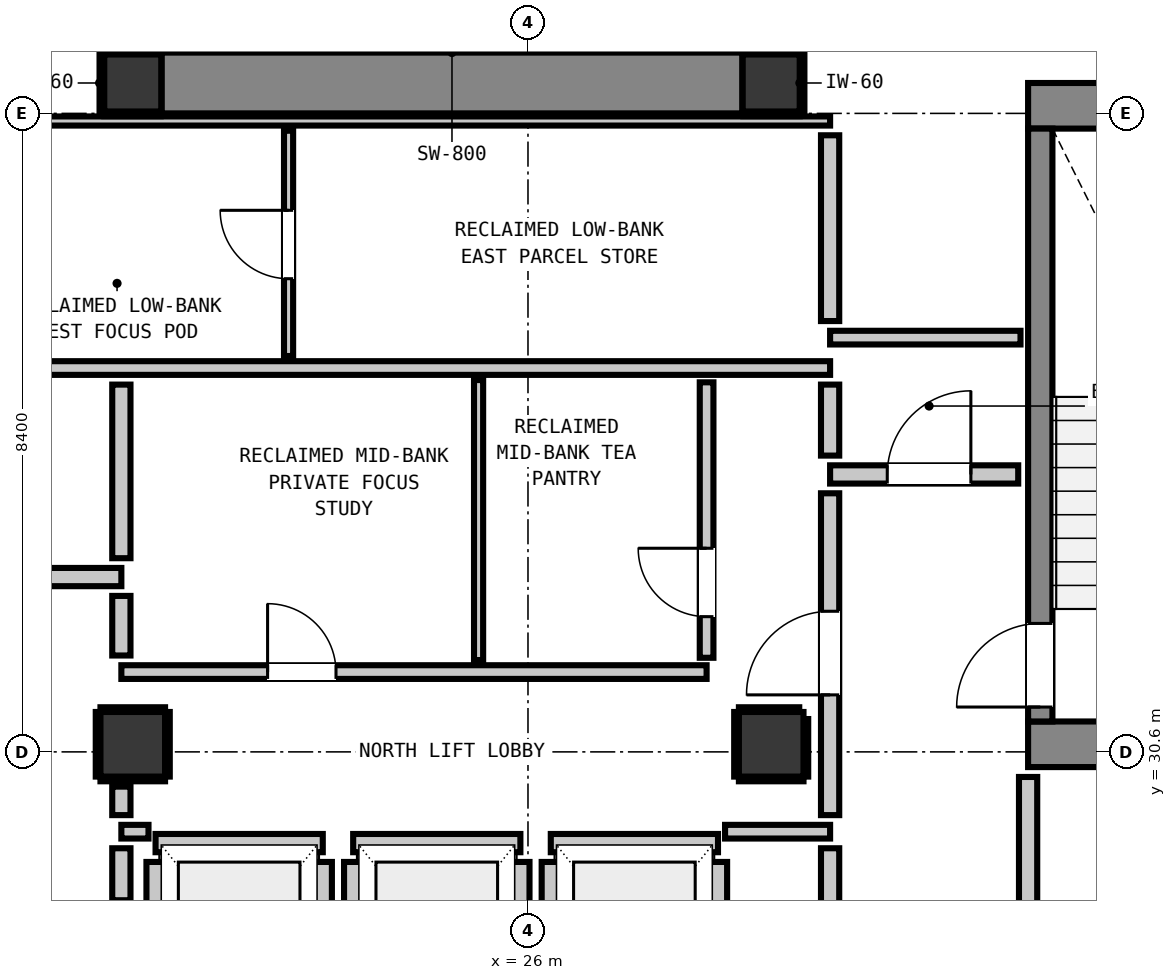
"""IFC4 building model, lengths in metres.
Left out: names, types, materials, properties, quantities, classifications, styles, units other than length and angle.
Written with IfcOpenShell. Run it as: python <this file> out.ifc"""

import sys

from ifc_helpers import new_model, si_unit, direction, frame, frame_2d, origin, origin_2d, place, context, subcontext, project, spatial, rectangle, extrude, element, fill, save


model = new_model("IFC4")
c1 = context("Model", 3, precision=1e-05, world=origin(), true_north=direction((0.0, 1.0)))
c2 = subcontext(c1, "Body", "Model", "MODEL_VIEW")
j1 = project(units=[si_unit("LENGTHUNIT", "METRE"), si_unit("PLANEANGLEUNIT", "RADIAN")], contexts=[c1])
p1 = place(None, origin())
s1 = spatial("IfcSite", under=j1, at=p1, CompositionType="ELEMENT")
p2 = place(p1, origin())
s2 = spatial("IfcBuilding", under=s1, at=p2, CompositionType="ELEMENT")
p3 = place(p2, frame((0.0, 0.0, 213.4)))
s3 = spatial("IfcBuildingStorey", under=s2, at=p3, CompositionType="ELEMENT", Elevation=213.4)
for number, where, z_axis, x_axis in (
    (1, (20.8, 39.4, 0.0), (0.0, 0.0, 1.0), (1.0, 0.0, 0.0)),
    (2, (29.2, 39.4, 0.0), (0.0, 0.0, 1.0), (1.0, 0.0, 0.0)),
):
    element("IfcColumn", number, at=place(p3, frame(where, z_axis=z_axis, x_axis=x_axis)), inside=s3, PredefinedType="COLUMN", context=c2, shape_type="SweptSolid", body=[
        extrude(rectangle(XDim=0.75, YDim=0.75, at=origin_2d()), origin(), (0.0, 0.0, 1.0), 3.32),
    ])
p4 = place(p3, frame((32.58, 39.1, 0.0), z_axis=(0.0, 0.0, 1.0), x_axis=(1.0, 0.0, 0.0)))
e3 = element("IfcWall", 3, at=p4, inside=s3, PredefinedType="SHEAR", context=c2, shape_type="SweptSolid", body=[
    extrude(rectangle(XDim=4.08, YDim=0.6, at=frame_2d((2.04, 0.0))), origin(), (0.0, 0.0, 1.0), 3.32),
])
p5 = place(p3, frame((32.58, 30.7, 0.0), z_axis=(0.0, 0.0, 1.0), x_axis=(1.0, 0.0, 0.0)))
e4 = element("IfcWall", 4, at=p5, inside=s3, PredefinedType="SHEAR", context=c2, shape_type="SweptSolid", body=[
    extrude(rectangle(XDim=3.54, YDim=0.6, at=frame_2d((1.77, 0.0))), origin(), (0.0, 0.0, 1.0), 3.32),
])
p6 = place(p3, frame((21.18, 39.4, 0.0), z_axis=(0.0, 0.0, 1.0), x_axis=(1.0, 0.0, 0.0)))
e5 = element("IfcWall", 5, at=p6, inside=s3, PredefinedType="SHEAR", context=c2, shape_type="SweptSolid", body=[
    extrude(rectangle(XDim=7.64, YDim=0.8, at=frame_2d((3.82, 0.0))), origin(), (0.0, 0.0, 1.0), 3.32),
])
p7 = place(p3, frame((32.74, 31.0, 0.0), z_axis=(0.0, 0.0, 1.0), x_axis=(0.0, 1.0, 0.0)))
e6 = element("IfcWall", 6, at=p7, inside=s3, PredefinedType="SHEAR", context=c2, shape_type="SweptSolid", body=[
    extrude(rectangle(XDim=7.8, YDim=0.32, at=frame_2d((3.9, 0.0))), origin(), (0.0, 0.0, 1.0), 3.32),
])
p8 = place(p7, frame((0.19, 0.0, 0.0)))
e7 = element("IfcOpeningElement", 7, at=p8, cuts=e6, PredefinedType="OPENING", context=c2, shape_type="SweptSolid", body=[
    extrude(rectangle(XDim=1.1, YDim=2.15, at=frame_2d((0.55, 1.075))), frame((0.0, 0.17, 0.0), z_axis=(0.0, -1.0, 0.0), x_axis=(1.0, 0.0, 0.0)), (0.0, 0.0, 1.0), 0.34),
])
for number, where, z_axis, x_axis in (
    (8, (20.8, 30.7, 0.0), (0.0, 0.0, 1.0), (1.0, 0.0, 0.0)),
    (9, (29.2, 30.7, 0.0), (0.0, 0.0, 1.0), (1.0, 0.0, 0.0)),
):
    element("IfcColumn", number, at=place(p3, frame(where, z_axis=z_axis, x_axis=x_axis)), inside=s3, PredefinedType="COLUMN", context=c2, shape_type="SweptSolid", body=[
        extrude(rectangle(XDim=0.85, YDim=0.85, at=origin_2d()), origin(), (0.0, 0.0, 1.0), 3.32),
    ])
p9 = place(p3, frame((21.1, 29.4, 0.0), z_axis=(0.0, 0.0, 1.0), x_axis=(1.0, 0.0, 0.0)))
e10 = element("IfcWall", 10, at=p9, inside=s3, PredefinedType="PARTITIONING", context=c2, shape_type="SweptSolid", body=[
    extrude(rectangle(XDim=2.2, YDim=0.24, at=frame_2d((1.1, 0.0))), origin(), (0.0, 0.0, 1.0), 3.1),
])
p10 = place(p3, frame((21.1, 27.048, 0.0), z_axis=(0.0, 0.0, 1.0), x_axis=(0.0, 1.0, 0.0)))
e11 = element("IfcWall", 11, at=p10, inside=s3, PredefinedType="PARTITIONING", context=c2, shape_type="SweptSolid", body=[
    extrude(rectangle(XDim=2.104, YDim=0.24, at=frame_2d((1.052, 0.0))), origin(), (0.0, 0.0, 1.0), 2.335),
])
p11 = place(p3, frame((23.3, 27.048, 0.0), z_axis=(0.0, 0.0, 1.0), x_axis=(0.0, 1.0, 0.0)))
e12 = element("IfcWall", 12, at=p11, inside=s3, PredefinedType="PARTITIONING", context=c2, shape_type="SweptSolid", body=[
    extrude(rectangle(XDim=2.104, YDim=0.24, at=frame_2d((1.052, 0.0))), origin(), (0.0, 0.0, 1.0), 3.1),
])
p12 = place(p3, frame((23.7, 29.4, 0.0), z_axis=(0.0, 0.0, 1.0), x_axis=(1.0, 0.0, 0.0)))
e13 = element("IfcWall", 13, at=p12, inside=s3, PredefinedType="PARTITIONING", context=c2, shape_type="SweptSolid", body=[
    extrude(rectangle(XDim=2.2, YDim=0.24, at=frame_2d((1.1, 0.0))), origin(), (0.0, 0.0, 1.0), 3.1),
])
for number, where, z_axis, x_axis in (
    (14, (23.7, 27.048, 0.0), (0.0, 0.0, 1.0), (0.0, 1.0, 0.0)),
    (15, (25.9, 27.048, 0.0), (0.0, 0.0, 1.0), (0.0, 1.0, 0.0)),
):
    element("IfcWall", number, at=place(p3, frame(where, z_axis=z_axis, x_axis=x_axis)), inside=s3, PredefinedType="PARTITIONING", context=c2, shape_type="SweptSolid", body=[
        extrude(rectangle(XDim=2.104, YDim=0.24, at=frame_2d((1.052, 0.0))), origin(), (0.0, 0.0, 1.0), 3.1),
    ])
p13 = place(p3, frame((26.3, 29.4, 0.0), z_axis=(0.0, 0.0, 1.0), x_axis=(1.0, 0.0, 0.0)))
e16 = element("IfcWall", 16, at=p13, inside=s3, PredefinedType="PARTITIONING", context=c2, shape_type="SweptSolid", body=[
    extrude(rectangle(XDim=2.2, YDim=0.24, at=frame_2d((1.1, 0.0))), origin(), (0.0, 0.0, 1.0), 3.1),
])
p14 = place(p3, frame((26.3, 27.048, 0.0), z_axis=(0.0, 0.0, 1.0), x_axis=(0.0, 1.0, 0.0)))
e17 = element("IfcWall", 17, at=p14, inside=s3, PredefinedType="PARTITIONING", context=c2, shape_type="SweptSolid", body=[
    extrude(rectangle(XDim=2.104, YDim=0.24, at=frame_2d((1.052, 0.0))), origin(), (0.0, 0.0, 1.0), 3.1),
])
p15 = place(p3, frame((28.5, 27.33, 0.0), z_axis=(0.0, 0.0, 1.0), x_axis=(0.0, 1.0, 0.0)))
e18 = element("IfcWall", 18, at=p15, inside=s3, PredefinedType="PARTITIONING", context=c2, shape_type="SweptSolid", body=[
    extrude(rectangle(XDim=1.822, YDim=0.24, at=frame_2d((0.911, 0.0))), origin(), (0.0, 0.0, 1.0), 3.1),
])
p16 = place(p3, frame((17.45, 32.9, 0.0), z_axis=(0.0, 0.0, 1.0), x_axis=(1.0, 0.0, 0.0)))
e19 = element("IfcWall", 19, at=p16, inside=s3, PredefinedType="PARTITIONING", context=c2, shape_type="SweptSolid", body=[
    extrude(rectangle(XDim=3.2, YDim=0.24, at=frame_2d((1.6, 0.0))), origin(), (0.0, 0.0, 1.0), 3.1),
])
p17 = place(p16, frame((0.159, 0.0, 0.0)))
e20 = element("IfcOpeningElement", 20, at=p17, cuts=e19, PredefinedType="OPENING", context=c2, shape_type="SweptSolid", body=[
    extrude(rectangle(XDim=1.1, YDim=2.15, at=frame_2d((0.55, 1.075))), frame((0.0, 0.13, 0.0), z_axis=(0.0, -1.0, 0.0), x_axis=(1.0, 0.0, 0.0)), (0.0, 0.0, 1.0), 0.26),
])
p18 = place(p3, frame((29.975, 34.25, 0.0), z_axis=(0.0, 0.0, 1.0), x_axis=(1.0, 0.0, 0.0)))
e21 = element("IfcWall", 21, at=p18, inside=s3, PredefinedType="PARTITIONING", context=c2, shape_type="SweptSolid", body=[
    extrude(rectangle(XDim=2.475, YDim=0.24, at=frame_2d((1.237, 0.0))), origin(), (0.0, 0.0, 1.0), 3.1),
])
p19 = place(p18, frame((0.752, 0.0, 0.0)))
e22 = element("IfcOpeningElement", 22, at=p19, cuts=e21, PredefinedType="OPENING", context=c2, shape_type="SweptSolid", body=[
    extrude(rectangle(XDim=1.1, YDim=2.15, at=frame_2d((0.55, 1.075))), frame((0.0, 0.13, 0.0), z_axis=(0.0, -1.0, 0.0), x_axis=(1.0, 0.0, 0.0)), (0.0, 0.0, 1.0), 0.26),
])
p20 = place(p3, frame((20.65, 29.55, 0.0), z_axis=(0.0, 0.0, 1.0), x_axis=(1.0, 0.0, 0.0)))
e23 = element("IfcWall", 23, at=p20, inside=s3, PredefinedType="PARTITIONING", context=c2, shape_type="SweptSolid", body=[
    extrude(rectangle(XDim=0.357, YDim=0.18, at=frame_2d((0.179, 0.0))), origin(), (0.0, 0.0, 1.0), 3.1),
])
p21 = place(p3, frame((28.593, 29.55, 0.0), z_axis=(0.0, 0.0, 1.0), x_axis=(1.0, 0.0, 0.0)))
e24 = element("IfcWall", 24, at=p21, inside=s3, PredefinedType="PARTITIONING", context=c2, shape_type="SweptSolid", body=[
    extrude(rectangle(XDim=1.382, YDim=0.18, at=frame_2d((0.691, 0.0))), origin(), (0.0, 0.0, 1.0), 3.1),
])
p22 = place(p3, frame((20.65, 31.65, 0.0), z_axis=(0.0, 0.0, 1.0), x_axis=(1.0, 0.0, 0.0)))
e25 = element("IfcWall", 25, at=p22, inside=s3, PredefinedType="PARTITIONING", context=c2, shape_type="SweptSolid", body=[
    extrude(rectangle(XDim=7.7, YDim=0.18, at=frame_2d((3.85, 0.0))), origin(), (0.0, 0.0, 1.0), 3.1),
])
p23 = place(p22, frame((1.924, 0.0, 0.0)))
e26 = element("IfcOpeningElement", 26, at=p23, cuts=e25, PredefinedType="OPENING", context=c2, shape_type="SweptSolid", body=[
    extrude(rectangle(XDim=0.9, YDim=2.1, at=frame_2d((0.45, 1.05))), frame((0.0, 0.1, 0.0), z_axis=(0.0, -1.0, 0.0), x_axis=(1.0, 0.0, 0.0)), (0.0, 0.0, 1.0), 0.2),
])
p24 = place(p3, frame((18.95, 35.65, 0.0), z_axis=(0.0, 0.0, 1.0), x_axis=(1.0, 0.0, 0.0)))
e27 = element("IfcWall", 27, at=p24, inside=s3, PredefinedType="PARTITIONING", context=c2, shape_type="SweptSolid", body=[
    extrude(rectangle(XDim=11.025, YDim=0.18, at=frame_2d((5.513, 0.0))), origin(), (0.0, 0.0, 1.0), 3.1),
])
p25 = place(p3, frame((29.975, 36.05, 0.0), z_axis=(0.0, 0.0, 1.0), x_axis=(1.0, 0.0, 0.0)))
e28 = element("IfcWall", 28, at=p25, inside=s3, PredefinedType="PARTITIONING", context=c2, shape_type="SweptSolid", body=[
    extrude(rectangle(XDim=2.505, YDim=0.18, at=frame_2d((1.252, 0.0))), origin(), (0.0, 0.0, 1.0), 3.1),
])
p26 = place(p3, frame((18.95, 38.9, 0.0), z_axis=(0.0, 0.0, 1.0), x_axis=(1.0, 0.0, 0.0)))
e29 = element("IfcWall", 29, at=p26, inside=s3, PredefinedType="PARTITIONING", context=c2, shape_type="SweptSolid", body=[
    extrude(rectangle(XDim=11.025, YDim=0.12, at=frame_2d((5.513, 0.0))), origin(), (0.0, 0.0, 1.0), 3.1),
])
p27 = place(p3, frame((20.65, 28.648, 0.0), z_axis=(0.0, 0.0, 1.0), x_axis=(0.0, 1.0, 0.0)))
e30 = element("IfcWall", 30, at=p27, inside=s3, PredefinedType="PARTITIONING", context=c2, shape_type="SweptSolid", body=[
    extrude(rectangle(XDim=0.684, YDim=0.24, at=frame_2d((0.342, 0.0))), origin(), (0.0, 0.0, 1.0), 2.335),
])
p28 = place(p3, frame((20.65, 29.768, 0.0), z_axis=(0.0, 0.0, 1.0), x_axis=(0.0, 1.0, 0.0)))
e31 = element("IfcWall", 31, at=p28, inside=s3, PredefinedType="PARTITIONING", context=c2, shape_type="SweptSolid", body=[
    extrude(rectangle(XDim=0.375, YDim=0.24, at=frame_2d((0.188, 0.0))), origin(), (0.0, 0.0, 1.0), 2.335),
])
p29 = place(p3, frame((20.65, 31.868, 0.0), z_axis=(0.0, 0.0, 1.0), x_axis=(0.0, 1.0, 0.0)))
e32 = element("IfcWall", 32, at=p29, inside=s3, PredefinedType="PARTITIONING", context=c2, shape_type="SweptSolid", body=[
    extrude(rectangle(XDim=0.784, YDim=0.24, at=frame_2d((0.392, 0.0))), origin(), (0.0, 0.0, 1.0), 2.335),
])
p30 = place(p3, frame((20.65, 33.148, 0.0), z_axis=(0.0, 0.0, 1.0), x_axis=(0.0, 1.0, 0.0)))
e33 = element("IfcWall", 33, at=p30, inside=s3, PredefinedType="PARTITIONING", context=c2, shape_type="SweptSolid", body=[
    extrude(rectangle(XDim=2.284, YDim=0.24, at=frame_2d((1.142, 0.0))), origin(), (0.0, 0.0, 1.0), 2.335),
])
p31 = place(p3, frame((29.975, 25.648, 0.0), z_axis=(0.0, 0.0, 1.0), x_axis=(0.0, 1.0, 0.0)))
e34 = element("IfcWall", 34, at=p31, inside=s3, PredefinedType="PARTITIONING", context=c2, shape_type="SweptSolid", body=[
    extrude(rectangle(XDim=3.684, YDim=0.24, at=frame_2d((1.842, 0.0))), origin(), (0.0, 0.0, 1.0), 3.1),
])
p32 = place(p3, frame((29.975, 29.768, 0.0), z_axis=(0.0, 0.0, 1.0), x_axis=(0.0, 1.0, 0.0)))
e35 = element("IfcWall", 35, at=p32, inside=s3, PredefinedType="PARTITIONING", context=c2, shape_type="SweptSolid", body=[
    extrude(rectangle(XDim=4.234, YDim=0.24, at=frame_2d((2.117, 0.0))), origin(), (0.0, 0.0, 1.0), 3.1),
])
p33 = place(p32, frame((1.582, 0.0, 0.0)))
e36 = element("IfcOpeningElement", 36, at=p33, cuts=e35, PredefinedType="OPENING", context=c2, shape_type="SweptSolid", body=[
    extrude(rectangle(XDim=1.1, YDim=2.15, at=frame_2d((0.55, 1.075))), frame((0.0, 0.13, 0.0), z_axis=(0.0, -1.0, 0.0), x_axis=(1.0, 0.0, 0.0)), (0.0, 0.0, 1.0), 0.26),
])
p34 = place(p3, frame((29.975, 34.498, 0.0), z_axis=(0.0, 0.0, 1.0), x_axis=(0.0, 1.0, 0.0)))
e37 = element("IfcWall", 37, at=p34, inside=s3, PredefinedType="PARTITIONING", context=c2, shape_type="SweptSolid", body=[
    extrude(rectangle(XDim=0.934, YDim=0.24, at=frame_2d((0.467, 0.0))), origin(), (0.0, 0.0, 1.0), 3.1),
])
p35 = place(p3, frame((29.975, 36.268, 0.0), z_axis=(0.0, 0.0, 1.0), x_axis=(0.0, 1.0, 0.0)))
e38 = element("IfcWall", 38, at=p35, inside=s3, PredefinedType="PARTITIONING", context=c2, shape_type="SweptSolid", body=[
    extrude(rectangle(XDim=2.444, YDim=0.24, at=frame_2d((1.222, 0.0))), origin(), (0.0, 0.0, 1.0), 3.1),
])
p36 = place(p3, frame((32.58, 25.648, 0.0), z_axis=(0.0, 0.0, 1.0), x_axis=(0.0, 1.0, 0.0)))
e39 = element("IfcWall", 39, at=p36, inside=s3, PredefinedType="PARTITIONING", context=c2, shape_type="SweptSolid", body=[
    extrude(rectangle(XDim=4.622, YDim=0.24, at=frame_2d((2.311, 0.0))), origin(), (0.0, 0.0, 1.0), 3.1),
])
p37 = place(p3, frame((28.35, 31.838, 0.0), z_axis=(0.0, 0.0, 1.0), x_axis=(0.0, 1.0, 0.0)))
e40 = element("IfcWall", 40, at=p37, inside=s3, PredefinedType="PARTITIONING", context=c2, shape_type="SweptSolid", body=[
    extrude(rectangle(XDim=3.624, YDim=0.18, at=frame_2d((1.812, 0.0))), origin(), (0.0, 0.0, 1.0), 3.1),
])
p38 = place(p37, frame((0.541, 0.0, 0.0)))
e41 = element("IfcOpeningElement", 41, at=p38, cuts=e40, PredefinedType="OPENING", context=c2, shape_type="SweptSolid", body=[
    extrude(rectangle(XDim=0.9, YDim=2.1, at=frame_2d((0.45, 1.05))), frame((0.0, 0.1, 0.0), z_axis=(0.0, -1.0, 0.0), x_axis=(1.0, 0.0, 0.0)), (0.0, 0.0, 1.0), 0.2),
])
p39 = place(p3, frame((22.85, 35.808, 0.0), z_axis=(0.0, 0.0, 1.0), x_axis=(0.0, 1.0, 0.0)))
e42 = element("IfcWall", 42, at=p39, inside=s3, PredefinedType="PARTITIONING", context=c2, shape_type="SweptSolid", body=[
    extrude(rectangle(XDim=2.964, YDim=0.12, at=frame_2d((1.482, 0.0))), origin(), (0.0, 0.0, 1.0), 3.1),
])
p40 = place(p39, frame((1.017, 0.0, 0.0)))
e43 = element("IfcOpeningElement", 43, at=p40, cuts=e42, PredefinedType="OPENING", context=c2, shape_type="SweptSolid", body=[
    extrude(rectangle(XDim=0.9, YDim=2.1, at=frame_2d((0.45, 1.05))), frame((0.0, 0.07, 0.0), z_axis=(0.0, -1.0, 0.0), x_axis=(1.0, 0.0, 0.0)), (0.0, 0.0, 1.0), 0.14),
])
p41 = place(p3, frame((25.35, 31.808, 0.0), z_axis=(0.0, 0.0, 1.0), x_axis=(0.0, 1.0, 0.0)))
e44 = element("IfcWall", 44, at=p41, inside=s3, PredefinedType="PARTITIONING", context=c2, shape_type="SweptSolid", body=[
    extrude(rectangle(XDim=3.684, YDim=0.12, at=frame_2d((1.842, 0.0))), origin(), (0.0, 0.0, 1.0), 3.1),
])
for number, where, z_axis, x_axis in (
    (45, (20.425, 38.993, 0.0), (0.0, 0.0, 1.0), (1.0, 0.0, 0.0)),
    (46, (20.425, 39.807, 0.0), (0.0, 0.0, 1.0), (1.0, 0.0, 0.0)),
):
    element("IfcWall", number, at=place(p3, frame(where, z_axis=z_axis, x_axis=x_axis)), inside=s3, PredefinedType="PARTITIONING", context=c2, shape_type="SweptSolid", body=[
        extrude(rectangle(XDim=0.742, YDim=0.06, at=frame_2d((0.371, 0.0))), origin(), (0.0, 0.0, 1.0), 1.45),
    ])
p42 = place(p3, frame((20.393, 39.025, 0.0), z_axis=(0.0, 0.0, 1.0), x_axis=(0.0, 1.0, 0.0)))
e47 = element("IfcWall", 47, at=p42, inside=s3, PredefinedType="PARTITIONING", context=c2, shape_type="SweptSolid", body=[
    extrude(rectangle(XDim=0.75, YDim=0.06, at=frame_2d((0.375, 0.0))), origin(), (0.0, 0.0, 1.0), 1.45),
])
for number, where, z_axis, x_axis in (
    (48, (28.833, 38.993, 0.0), (0.0, 0.0, 1.0), (1.0, 0.0, 0.0)),
    (49, (28.833, 39.807, 0.0), (0.0, 0.0, 1.0), (1.0, 0.0, 0.0)),
):
    element("IfcWall", number, at=place(p3, frame(where, z_axis=z_axis, x_axis=x_axis)), inside=s3, PredefinedType="PARTITIONING", context=c2, shape_type="SweptSolid", body=[
        extrude(rectangle(XDim=0.742, YDim=0.06, at=frame_2d((0.371, 0.0))), origin(), (0.0, 0.0, 1.0), 1.45),
    ])
p43 = place(p3, frame((29.607, 39.025, 0.0), z_axis=(0.0, 0.0, 1.0), x_axis=(0.0, 1.0, 0.0)))
e50 = element("IfcWall", 50, at=p43, inside=s3, PredefinedType="PARTITIONING", context=c2, shape_type="SweptSolid", body=[
    extrude(rectangle(XDim=0.75, YDim=0.06, at=frame_2d((0.375, 0.0))), origin(), (0.0, 0.0, 1.0), 1.45),
])
for number, where, z_axis, x_axis in (
    (51, (20.375, 30.243, 0.0), (0.0, 0.0, 1.0), (1.0, 0.0, 0.0)),
    (52, (20.375, 31.157, 0.0), (0.0, 0.0, 1.0), (1.0, 0.0, 0.0)),
    (53, (20.343, 30.275, 0.0), (0.0, 0.0, 1.0), (0.0, 1.0, 0.0)),
    (54, (21.257, 30.275, 0.0), (0.0, 0.0, 1.0), (0.0, 1.0, 0.0)),
    (55, (28.775, 30.243, 0.0), (0.0, 0.0, 1.0), (1.0, 0.0, 0.0)),
):
    element("IfcWall", number, at=place(p3, frame(where, z_axis=z_axis, x_axis=x_axis)), inside=s3, PredefinedType="PARTITIONING", context=c2, shape_type="SweptSolid", body=[
        extrude(rectangle(XDim=0.85, YDim=0.06, at=frame_2d((0.425, 0.0))), origin(), (0.0, 0.0, 1.0), 1.45),
    ])
p44 = place(p3, frame((28.775, 31.157, 0.0), z_axis=(0.0, 0.0, 1.0), x_axis=(1.0, 0.0, 0.0)))
e56 = element("IfcWall", 56, at=p44, inside=s3, PredefinedType="PARTITIONING", context=c2, shape_type="SweptSolid", body=[
    extrude(rectangle(XDim=0.794, YDim=0.06, at=frame_2d((0.397, 0.0))), origin(), (0.0, 0.0, 1.0), 1.45),
])
p45 = place(p3, frame((28.743, 30.275, 0.0), z_axis=(0.0, 0.0, 1.0), x_axis=(0.0, 1.0, 0.0)))
e57 = element("IfcWall", 57, at=p45, inside=s3, PredefinedType="PARTITIONING", context=c2, shape_type="SweptSolid", body=[
    extrude(rectangle(XDim=0.85, YDim=0.06, at=frame_2d((0.425, 0.0))), origin(), (0.0, 0.0, 1.0), 1.45),
])
p46 = place(p3, frame((29.657, 30.275, 0.0), z_axis=(0.0, 0.0, 1.0), x_axis=(0.0, 1.0, 0.0)))
e58 = element("IfcWall", 58, at=p46, inside=s3, PredefinedType="PARTITIONING", context=c2, shape_type="SweptSolid", body=[
    extrude(rectangle(XDim=0.757, YDim=0.06, at=frame_2d((0.378, 0.0))), origin(), (0.0, 0.0, 1.0), 1.45),
])
p47 = place(p8, origin())
e59 = element("IfcDoor", 59, at=p47, inside=s3, OperationType="SINGLE_SWING_LEFT", PredefinedType="DOOR", context=c2, shape_type="SweptSolid", body=[
    extrude(rectangle(XDim=1.1, YDim=2.15, at=frame_2d((0.55, 1.075))), frame((0.0, 0.025, 0.0), z_axis=(0.0, -1.0, 0.0), x_axis=(1.0, 0.0, 0.0)), (0.0, 0.0, 1.0), 0.05),
])
fill(e7, e59)
p48 = place(p33, origin())
e60 = element("IfcDoor", 60, at=p48, inside=s3, OperationType="SINGLE_SWING_LEFT", PredefinedType="DOOR", context=c2, shape_type="SweptSolid", body=[
    extrude(rectangle(XDim=1.1, YDim=2.15, at=frame_2d((0.55, 1.075))), frame((0.0, 0.025, 0.0), z_axis=(0.0, -1.0, 0.0), x_axis=(1.0, 0.0, 0.0)), (0.0, 0.0, 1.0), 0.05),
])
fill(e36, e60)
p49 = place(p19, origin())
e61 = element("IfcDoor", 61, at=p49, inside=s3, OperationType="SINGLE_SWING_RIGHT", PredefinedType="DOOR", context=c2, shape_type="SweptSolid", body=[
    extrude(rectangle(XDim=1.1, YDim=2.15, at=frame_2d((0.55, 1.075))), frame((0.0, 0.025, 0.0), z_axis=(0.0, -1.0, 0.0), x_axis=(1.0, 0.0, 0.0)), (0.0, 0.0, 1.0), 0.05),
])
fill(e22, e61)
p50 = place(p40, origin())
e62 = element("IfcDoor", 62, at=p50, inside=s3, OperationType="SINGLE_SWING_RIGHT", PredefinedType="DOOR", context=c2, shape_type="SweptSolid", body=[
    extrude(rectangle(XDim=0.9, YDim=2.1, at=frame_2d((0.45, 1.05))), frame((0.0, 0.025, 0.0), z_axis=(0.0, -1.0, 0.0), x_axis=(1.0, 0.0, 0.0)), (0.0, 0.0, 1.0), 0.05),
])
fill(e43, e62)
p51 = place(p23, origin())
e63 = element("IfcDoor", 63, at=p51, inside=s3, OperationType="SINGLE_SWING_LEFT", PredefinedType="DOOR", context=c2, shape_type="SweptSolid", body=[
    extrude(rectangle(XDim=0.9, YDim=2.1, at=frame_2d((0.45, 1.05))), frame((0.0, 0.025, 0.0), z_axis=(0.0, -1.0, 0.0), x_axis=(1.0, 0.0, 0.0)), (0.0, 0.0, 1.0), 0.05),
])
fill(e26, e63)
p52 = place(p38, origin())
e64 = element("IfcDoor", 64, at=p52, inside=s3, OperationType="SINGLE_SWING_RIGHT", PredefinedType="DOOR", context=c2, shape_type="SweptSolid", body=[
    extrude(rectangle(XDim=0.9, YDim=2.1, at=frame_2d((0.45, 1.05))), frame((0.0, 0.025, 0.0), z_axis=(0.0, -1.0, 0.0), x_axis=(1.0, 0.0, 0.0)), (0.0, 0.0, 1.0), 0.05),
])
fill(e41, e64)
save(model, sys.argv[1])
